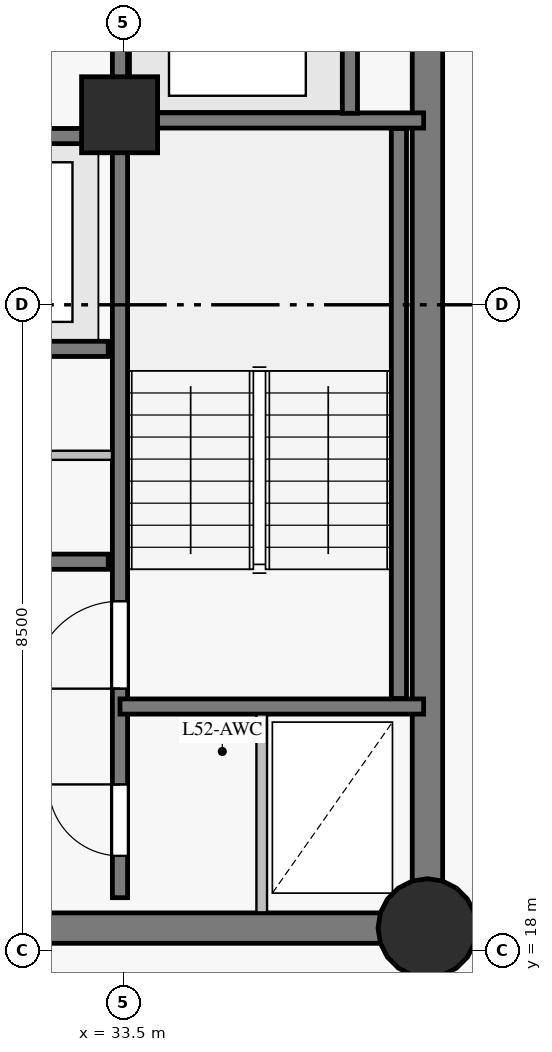
"""IFC4 building model, lengths in metres.
Left out: names, types, materials, properties, quantities, classifications, styles, units other than length and angle.
Written with IfcOpenShell. Run it as: python <this file> out.ifc"""

import sys

from ifc_helpers import new_model, si_unit, direction, frame, frame_2d, origin, origin_with_axes, origin_2d, place, context, subcontext, project, spatial, rectangle, circle, extrude, source, transform, mapped, element, fill, save


model = new_model("IFC4")
c1 = context("Model", 3, precision=1e-05, world=origin(), true_north=direction((0.0, 1.0)))
c2 = subcontext(c1, "Body", "Model", "MODEL_VIEW")
j1 = project(units=[si_unit("LENGTHUNIT", "METRE"), si_unit("PLANEANGLEUNIT", "RADIAN")], contexts=[c1])
p1 = place(None, origin())
s1 = spatial("IfcSite", under=j1, at=p1, CompositionType="ELEMENT")
p2 = place(p1, origin())
s2 = spatial("IfcBuilding", under=s1, at=p2, CompositionType="ELEMENT")
p3 = place(p2, frame((0.0, 0.0, 180.95)))
s3 = spatial("IfcBuildingStorey", under=s2, at=p3, CompositionType="ELEMENT", Elevation=180.95)
p4 = place(p3, frame((26.55, 18.3, 0.0), z_axis=(0.0, 0.0, 1.0), x_axis=(1.0, 0.0, 0.0)))
e1 = element("IfcWall", 1, at=p4, inside=s3, PredefinedType="SHEAR", context=c2, shape_type="SweptSolid", body=[
    extrude(rectangle(XDim=10.95, YDim=0.4, at=frame_2d((5.475, 0.0))), origin(), (0.0, 0.0, 1.0), 2.825),
])
p5 = place(p4, frame((4.55, 0.0, 0.0)))
e2 = element("IfcOpeningElement", 2, at=p5, cuts=e1, PredefinedType="OPENING", context=c2, shape_type="SweptSolid", body=[
    extrude(rectangle(XDim=1.4, YDim=2.2, at=frame_2d((0.7, 1.1))), frame((0.0, 0.21, 0.0), z_axis=(0.0, -1.0, 0.0), x_axis=(1.0, 0.0, 0.0)), (0.0, 0.0, 1.0), 0.42),
])
p6 = place(p3, frame((37.5, 18.3, 0.0), z_axis=(0.0, 0.0, 1.0), x_axis=(0.0, 1.0, 0.0)))
e3 = element("IfcWall", 3, at=p6, inside=s3, PredefinedType="SHEAR", context=c2, shape_type="SweptSolid", body=[
    extrude(rectangle(XDim=16.4, YDim=0.4, at=frame_2d((8.2, 0.0))), origin(), (0.0, 0.0, 1.0), 2.825),
])
p7 = place(p6, frame((14.15, 0.0, 0.0)))
e4 = element("IfcOpeningElement", 4, at=p7, cuts=e3, PredefinedType="OPENING", context=c2, shape_type="SweptSolid", body=[
    extrude(rectangle(XDim=1.2, YDim=2.15, at=frame_2d((0.6, 1.075))), frame((0.0, 0.21, 0.0), z_axis=(0.0, -1.0, 0.0), x_axis=(1.0, 0.0, 0.0)), (0.0, 0.0, 1.0), 0.42),
])
m1 = source(origin_with_axes(), c2, "Body", "SweptSolid", [
    extrude(circle(Radius=0.65, at=origin_2d()), origin(), (0.0, 0.0, 1.0), 3.05),
])
p8 = place(p3, frame((37.5, 18.3, 0.0), z_axis=(0.0, 0.0, 1.0), x_axis=(1.0, 0.0, 0.0)))
e5 = element("IfcColumn", 5, at=p8, inside=s3, PredefinedType="COLUMN", context=c2, shape_type="MappedRepresentation", body=[
    mapped(m1, transform((0.0, 0.0, 0.0), scale=1.0)),
])
m2 = source(origin_with_axes(), c2, "Body", "SweptSolid", [
    extrude(rectangle(XDim=1.0, YDim=1.0, at=origin_2d()), origin(), (0.0, 0.0, 1.0), 3.05),
])
p9 = place(p3, frame((33.45, 29.0, 0.0), z_axis=(0.0, 0.0, 1.0), x_axis=(1.0, 0.0, 0.0)))
e6 = element("IfcColumn", 6, at=p9, inside=s3, PredefinedType="COLUMN", context=c2, shape_type="MappedRepresentation", body=[
    mapped(m2, transform((0.0, 0.0, 0.0), scale=1.0)),
])
p10 = place(p3, frame((33.455, 18.7, 0.0), z_axis=(0.0, 0.0, 1.0), x_axis=(0.0, 1.0, 0.0)))
e7 = element("IfcWall", 7, at=p10, inside=s3, PredefinedType="SHEAR", context=c2, shape_type="SweptSolid", body=[
    extrude(rectangle(XDim=15.6, YDim=0.2, at=frame_2d((7.8, 0.0))), origin(), (0.0, 0.0, 1.0), 2.825),
])
p11 = place(p10, frame((2.75, 0.0, 0.0)))
e8 = element("IfcOpeningElement", 8, at=p11, cuts=e7, PredefinedType="OPENING", context=c2, shape_type="SweptSolid", body=[
    extrude(rectangle(XDim=1.15, YDim=2.15, at=frame_2d((0.575, 1.075))), frame((0.0, 0.11, 0.0), z_axis=(0.0, -1.0, 0.0), x_axis=(1.0, 0.0, 0.0)), (0.0, 0.0, 1.0), 0.22),
])
p12 = place(p10, frame((0.55, 0.0, 0.0)))
e9 = element("IfcOpeningElement", 9, at=p12, cuts=e7, PredefinedType="OPENING", context=c2, shape_type="SweptSolid", body=[
    extrude(rectangle(XDim=0.94, YDim=2.1, at=frame_2d((0.47, 1.05))), frame((0.0, 0.11, 0.0), z_axis=(0.0, -1.0, 0.0), x_axis=(1.0, 0.0, 0.0)), (0.0, 0.0, 1.0), 0.22),
])
p13 = place(p3, frame((23.7, 23.12, 0.0), z_axis=(0.0, 0.0, 1.0), x_axis=(1.0, 0.0, 0.0)))
e10 = element("IfcWall", 10, at=p13, inside=s3, PredefinedType="SHEAR", context=c2, shape_type="SweptSolid", body=[
    extrude(rectangle(XDim=9.6, YDim=0.2, at=frame_2d((4.8, 0.0))), origin(), (0.0, 0.0, 1.0), 2.825),
])
p14 = place(p13, frame((2.4, 0.0, 0.0)))
e11 = element("IfcOpeningElement", 11, at=p14, cuts=e10, PredefinedType="OPENING", context=c2, shape_type="SweptSolid", body=[
    extrude(rectangle(XDim=1.0, YDim=2.15, at=frame_2d((0.5, 1.075))), frame((0.0, 0.11, 0.0), z_axis=(0.0, -1.0, 0.0), x_axis=(1.0, 0.0, 0.0)), (0.0, 0.0, 1.0), 0.22),
])
p15 = place(p3, frame((23.7, 25.92, 0.0), z_axis=(0.0, 0.0, 1.0), x_axis=(1.0, 0.0, 0.0)))
e12 = element("IfcWall", 12, at=p15, inside=s3, PredefinedType="SHEAR", context=c2, shape_type="SweptSolid", body=[
    extrude(rectangle(XDim=9.6, YDim=0.2, at=frame_2d((4.8, 0.0))), origin(), (0.0, 0.0, 1.0), 2.825),
])
p16 = place(p3, frame((23.7, 28.72, 0.0), z_axis=(0.0, 0.0, 1.0), x_axis=(1.0, 0.0, 0.0)))
e13 = element("IfcWall", 13, at=p16, inside=s3, PredefinedType="SHEAR", context=c2, shape_type="SweptSolid", body=[
    extrude(rectangle(XDim=9.6, YDim=0.2, at=frame_2d((4.8, 0.0))), origin(), (0.0, 0.0, 1.0), 2.825),
])
p17 = place(p16, frame((0.6, 0.0, 0.0)))
e14 = element("IfcOpeningElement", 14, at=p17, cuts=e13, PredefinedType="OPENING", context=c2, shape_type="SweptSolid", body=[
    extrude(rectangle(XDim=1.1, YDim=2.15, at=frame_2d((0.55, 1.075))), frame((0.0, 0.11, 0.0), z_axis=(0.0, -1.0, 0.0), x_axis=(1.0, 0.0, 0.0)), (0.0, 0.0, 1.0), 0.22),
])
p18 = place(p16, frame((2.98, 0.0, 0.0)))
e15 = element("IfcOpeningElement", 15, at=p18, cuts=e13, PredefinedType="OPENING", context=c2, shape_type="SweptSolid", body=[
    extrude(rectangle(XDim=1.1, YDim=2.15, at=frame_2d((0.55, 1.075))), frame((0.0, 0.11, 0.0), z_axis=(0.0, -1.0, 0.0), x_axis=(1.0, 0.0, 0.0)), (0.0, 0.0, 1.0), 0.22),
])
p19 = place(p16, frame((5.36, 0.0, 0.0)))
e16 = element("IfcOpeningElement", 16, at=p19, cuts=e13, PredefinedType="OPENING", context=c2, shape_type="SweptSolid", body=[
    extrude(rectangle(XDim=1.1, YDim=2.15, at=frame_2d((0.55, 1.075))), frame((0.0, 0.11, 0.0), z_axis=(0.0, -1.0, 0.0), x_axis=(1.0, 0.0, 0.0)), (0.0, 0.0, 1.0), 0.22),
])
p20 = place(p16, frame((7.74, 0.0, 0.0)))
e17 = element("IfcOpeningElement", 17, at=p20, cuts=e13, PredefinedType="OPENING", context=c2, shape_type="SweptSolid", body=[
    extrude(rectangle(XDim=1.1, YDim=2.15, at=frame_2d((0.55, 1.075))), frame((0.0, 0.11, 0.0), z_axis=(0.0, -1.0, 0.0), x_axis=(1.0, 0.0, 0.0)), (0.0, 0.0, 1.0), 0.22),
])
p21 = place(p3, frame((37.125, 21.32, 0.0), z_axis=(0.0, 0.0, 1.0), x_axis=(0.0, 1.0, 0.0)))
e18 = element("IfcWall", 18, at=p21, inside=s3, PredefinedType="SHEAR", context=c2, shape_type="SweptSolid", body=[
    extrude(rectangle(XDim=7.5, YDim=0.2, at=frame_2d((3.75, 0.0))), origin(), (0.0, 0.0, 1.0), 2.825),
])
for number, where, z_axis, x_axis in (
    (19, (33.455, 21.215, 0.0), (0.0, 0.0, 1.0), (1.0, 0.0, 0.0)),
    (20, (33.455, 28.925, 0.0), (0.0, 0.0, 1.0), (1.0, 0.0, 0.0)),
):
    element("IfcWall", number, at=place(p3, frame(where, z_axis=z_axis, x_axis=x_axis)), inside=s3, PredefinedType="SHEAR", context=c2, shape_type="SweptSolid", body=[
        extrude(rectangle(XDim=3.995, YDim=0.2, at=frame_2d((1.998, 0.0))), origin(), (0.0, 0.0, 1.0), 2.825),
    ])
p22 = place(p3, frame((36.48, 29.02, 0.0), z_axis=(0.0, 0.0, 1.0), x_axis=(0.0, 1.0, 0.0)))
e21 = element("IfcWall", 21, at=p22, inside=s3, PredefinedType="SHEAR", context=c2, shape_type="SweptSolid", body=[
    extrude(rectangle(XDim=2.86, YDim=0.2, at=frame_2d((1.43, 0.0))), origin(), (0.0, 0.0, 1.0), 2.825),
])
p23 = place(p3, frame((23.652, 24.52, 0.0), z_axis=(0.0, 0.0, 1.0), x_axis=(1.0, 0.0, 0.0)))
e22 = element("IfcWall", 22, at=p23, inside=s3, PredefinedType="PARTITIONING", context=c2, shape_type="SweptSolid", body=[
    extrude(rectangle(XDim=9.698, YDim=0.12, at=frame_2d((4.849, 0.0))), origin(), (0.0, 0.0, 1.0), 2.825),
])
p24 = place(p23, frame((4.2, 0.0, 0.0)))
e23 = element("IfcOpeningElement", 23, at=p24, cuts=e22, PredefinedType="OPENING", context=c2, shape_type="SweptSolid", body=[
    extrude(rectangle(XDim=0.94, YDim=2.1, at=frame_2d((0.47, 1.05))), frame((0.0, 0.07, 0.0), z_axis=(0.0, -1.0, 0.0), x_axis=(1.0, 0.0, 0.0)), (0.0, 0.0, 1.0), 0.14),
])
p25 = place(p3, frame((35.32, 18.507, 0.0), z_axis=(0.0, 0.0, 1.0), x_axis=(0.0, 1.0, 0.0)))
e24 = element("IfcWall", 24, at=p25, inside=s3, PredefinedType="PARTITIONING", context=c2, shape_type="SweptSolid", body=[
    extrude(rectangle(XDim=2.604, YDim=0.14, at=frame_2d((1.302, 0.0))), origin(), (0.0, 0.0, 1.0), 2.825),
])
m3 = source(origin_with_axes(), c2, "Body", "SweptSolid", [
    extrude(rectangle(XDim=1.15, YDim=2.15, at=frame_2d((0.575, 1.075))), frame((0.0, 0.025, 0.0), z_axis=(0.0, -1.0, 0.0), x_axis=(1.0, 0.0, 0.0)), (0.0, 0.0, 1.0), 0.05),
])
p26 = place(p11, origin())
e25 = element("IfcDoor", 25, at=p26, inside=s3, OperationType="SINGLE_SWING_LEFT", PredefinedType="DOOR", context=c2, shape_type="MappedRepresentation", body=[
    mapped(m3, transform((0.0, 0.0, 0.0), scale=1.0)),
])
fill(e8, e25)
m4 = source(origin_with_axes(), c2, "Body", "SweptSolid", [
    extrude(rectangle(XDim=0.94, YDim=2.1, at=frame_2d((0.47, 1.05))), frame((0.0, 0.025, 0.0), z_axis=(0.0, -1.0, 0.0), x_axis=(1.0, 0.0, 0.0)), (0.0, 0.0, 1.0), 0.05),
])
p27 = place(p12, origin())
e26 = element("IfcDoor", 26, at=p27, inside=s3, OperationType="SINGLE_SWING_RIGHT", PredefinedType="DOOR", context=c2, shape_type="MappedRepresentation", body=[
    mapped(m4, transform((0.0, 0.0, 0.0), scale=1.0)),
])
fill(e9, e26)
save(model, sys.argv[1])
